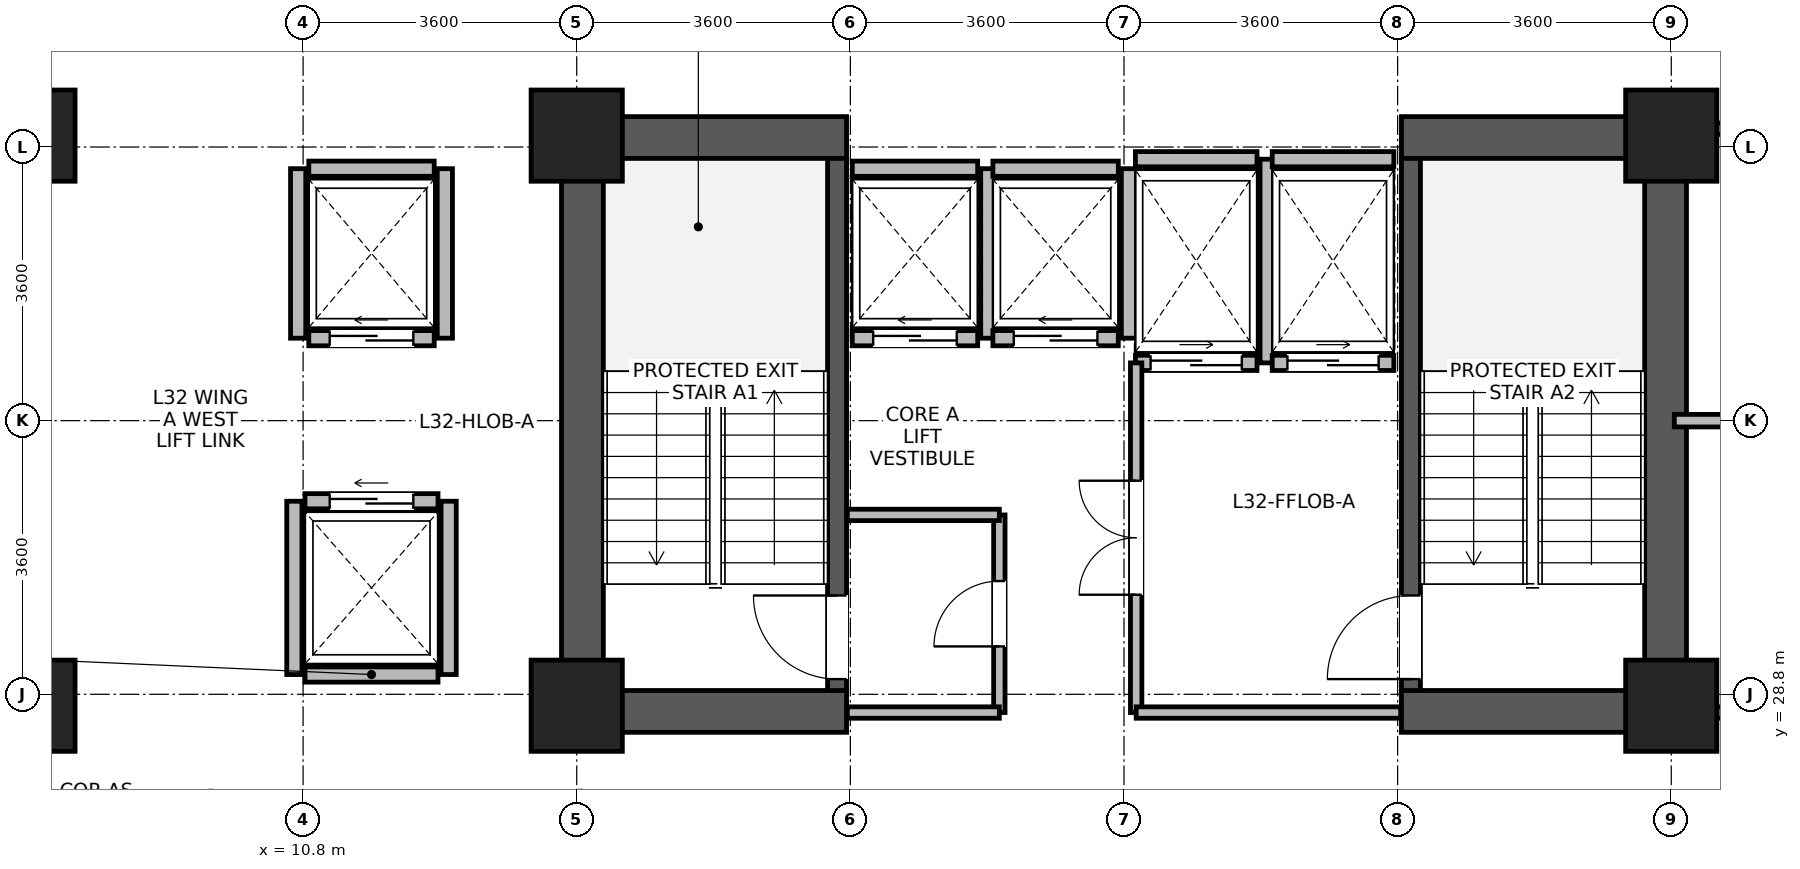
"""IFC4 building model, lengths in metres.
Left out: names, types, materials, properties, quantities, classifications, styles, units other than length and angle.
Written with IfcOpenShell. Run it as: python <this file> out.ifc"""

import sys

from ifc_helpers import new_model, si_unit, direction, frame, frame_2d, origin, origin_2d, place, context, subcontext, project, spatial, rectangle, extrude, source, transform, mapped, element, fill, save


model = new_model("IFC4")
c1 = context("Model", 3, precision=1e-05, world=origin(), true_north=direction((0.0, 1.0)))
c2 = subcontext(c1, "Body", "Model", "MODEL_VIEW")
j1 = project(units=[si_unit("LENGTHUNIT", "METRE"), si_unit("PLANEANGLEUNIT", "RADIAN")], contexts=[c1])
p1 = place(None, origin())
s1 = spatial("IfcSite", under=j1, at=p1, CompositionType="ELEMENT")
p2 = place(p1, origin())
s2 = spatial("IfcBuilding", under=s1, at=p2, CompositionType="ELEMENT")
p3 = place(p2, frame((0.0, 0.0, 126.7)))
s3 = spatial("IfcBuildingStorey", under=s2, at=p3, CompositionType="ELEMENT", Elevation=126.7)
for number, where, z_axis, x_axis in (
    (1, (14.475, 28.3, 0.0), (0.0, 0.0, 1.0), (0.0, 1.0, 0.0)),
    (2, (28.725, 28.3, 0.0), (0.0, 0.0, 1.0), (0.0, 1.0, 0.0)),
):
    element("IfcWall", number, at=place(p3, frame(where, z_axis=z_axis, x_axis=x_axis)), inside=s3, PredefinedType="SHEAR", context=c2, shape_type="SweptSolid", body=[
        extrude(rectangle(XDim=8.1, YDim=0.55, at=frame_2d((4.05, 0.0))), origin(), (0.0, 0.0, 1.0), 3.34),
    ])
for number, where, z_axis, x_axis in (
    (3, (14.75, 28.575, 0.0), (0.0, 0.0, 1.0), (1.0, 0.0, 0.0)),
    (4, (25.25, 28.575, 0.0), (0.0, 0.0, 1.0), (1.0, 0.0, 0.0)),
    (5, (14.75, 36.125, 0.0), (0.0, 0.0, 1.0), (1.0, 0.0, 0.0)),
    (6, (25.25, 36.125, 0.0), (0.0, 0.0, 1.0), (1.0, 0.0, 0.0)),
):
    element("IfcWall", number, at=place(p3, frame(where, z_axis=z_axis, x_axis=x_axis)), inside=s3, PredefinedType="SHEAR", context=c2, shape_type="SweptSolid", body=[
        extrude(rectangle(XDim=3.2, YDim=0.55, at=frame_2d((1.6, 0.0))), origin(), (0.0, 0.0, 1.0), 3.34),
    ])
p4 = place(p3, frame((17.825, 28.85, 0.0), z_axis=(0.0, 0.0, 1.0), x_axis=(0.0, 1.0, 0.0)))
e7 = element("IfcWall", 7, at=p4, inside=s3, PredefinedType="SHEAR", context=c2, shape_type="SweptSolid", body=[
    extrude(rectangle(XDim=7.0, YDim=0.25, at=frame_2d((3.5, 0.0))), origin(), (0.0, 0.0, 1.0), 3.34),
])
p5 = place(p4, frame((0.15, 0.0, 0.0)))
e8 = element("IfcOpeningElement", 8, at=p5, cuts=e7, PredefinedType="OPENING", context=c2, shape_type="SweptSolid", body=[
    extrude(rectangle(XDim=1.1, YDim=2.08, at=frame_2d((0.55, 1.04))), frame((0.0, 0.135, 0.0), z_axis=(0.0, -1.0, 0.0), x_axis=(1.0, 0.0, 0.0)), (0.0, 0.0, 1.0), 0.27),
])
p6 = place(p3, frame((25.375, 28.85, 0.0), z_axis=(0.0, 0.0, 1.0), x_axis=(0.0, 1.0, 0.0)))
e9 = element("IfcWall", 9, at=p6, inside=s3, PredefinedType="SHEAR", context=c2, shape_type="SweptSolid", body=[
    extrude(rectangle(XDim=7.0, YDim=0.25, at=frame_2d((3.5, 0.0))), origin(), (0.0, 0.0, 1.0), 3.34),
])
p7 = place(p6, frame((0.15, 0.0, 0.0)))
e10 = element("IfcOpeningElement", 10, at=p7, cuts=e9, PredefinedType="OPENING", context=c2, shape_type="SweptSolid", body=[
    extrude(rectangle(XDim=1.1, YDim=2.08, at=frame_2d((0.55, 1.04))), frame((0.0, 0.135, 0.0), z_axis=(0.0, -1.0, 0.0), x_axis=(1.0, 0.0, 0.0)), (0.0, 0.0, 1.0), 0.27),
])
m1 = source(origin(), c2, "Body", "SweptSolid", [
    extrude(rectangle(XDim=1.2, YDim=1.2, at=origin_2d()), origin(), (0.0, 0.0, 1.0), 3.7),
])
for number, where, z_axis, x_axis in (
    (11, (7.2, 28.65, 0.0), (0.0, 0.0, 1.0), (1.0, 0.0, 0.0)),
    (12, (7.2, 36.15, 0.0), (0.0, 0.0, 1.0), (1.0, 0.0, 0.0)),
    (13, (14.4, 28.65, 0.0), (0.0, 0.0, 1.0), (1.0, 0.0, 0.0)),
    (14, (14.4, 36.15, 0.0), (0.0, 0.0, 1.0), (1.0, 0.0, 0.0)),
    (15, (28.8, 28.65, 0.0), (0.0, 0.0, 1.0), (1.0, 0.0, 0.0)),
    (16, (28.8, 36.15, 0.0), (0.0, 0.0, 1.0), (1.0, 0.0, 0.0)),
):
    element("IfcColumn", number, at=place(p3, frame(where, z_axis=z_axis, x_axis=x_axis)), inside=s3, PredefinedType="COLUMN", context=c2, shape_type="MappedRepresentation", body=[
        mapped(m1, transform((0.0, 0.0, 0.0), x_axis=(1.0, 0.0, 0.0), y_axis=(0.0, 1.0, 0.0), z_axis=(0.0, 0.0, 1.0), scale=1.0)),
    ])
p8 = place(p3, frame((18.025, 33.485, 0.0), z_axis=(0.0, 0.0, 1.0), x_axis=(1.0, 0.0, 0.0)))
e17 = element("IfcWall", 17, at=p8, inside=s3, PredefinedType="PARTITIONING", context=c2, shape_type="SweptSolid", body=[
    extrude(rectangle(XDim=1.65, YDim=0.2, at=frame_2d((0.825, 0.0))), origin(), (0.0, 0.0, 1.0), 3.32),
])
p9 = place(p8, frame((0.275, 0.0, 0.0)))
e18 = element("IfcOpeningElement", 18, at=p9, cuts=e17, PredefinedType="OPENING", context=c2, shape_type="SweptSolid", body=[
    extrude(rectangle(XDim=1.1, YDim=2.12, at=frame_2d((0.55, 1.06))), frame((0.0, 0.11, 0.0), z_axis=(0.0, -1.0, 0.0), x_axis=(1.0, 0.0, 0.0)), (0.0, 0.0, 1.0), 0.22),
])
p10 = place(p3, frame((18.025, 35.715, 0.0), z_axis=(0.0, 0.0, 1.0), x_axis=(1.0, 0.0, 0.0)))
e19 = element("IfcWall", 19, at=p10, inside=s3, PredefinedType="PARTITIONING", context=c2, shape_type="SweptSolid", body=[
    extrude(rectangle(XDim=1.65, YDim=0.2, at=frame_2d((0.825, 0.0))), origin(), (0.0, 0.0, 1.0), 3.32),
])
p11 = place(p3, frame((19.815, 33.485, 0.0), z_axis=(0.0, 0.0, 1.0), x_axis=(0.0, 1.0, 0.0)))
e20 = element("IfcWall", 20, at=p11, inside=s3, PredefinedType="PARTITIONING", context=c2, shape_type="SweptSolid", body=[
    extrude(rectangle(XDim=2.23, YDim=0.2, at=frame_2d((1.115, 0.0))), origin(), (0.0, 0.0, 1.0), 3.32),
])
p12 = place(p3, frame((19.875, 33.485, 0.0), z_axis=(0.0, 0.0, 1.0), x_axis=(1.0, 0.0, 0.0)))
e21 = element("IfcWall", 21, at=p12, inside=s3, PredefinedType="PARTITIONING", context=c2, shape_type="SweptSolid", body=[
    extrude(rectangle(XDim=1.65, YDim=0.2, at=frame_2d((0.825, 0.0))), origin(), (0.0, 0.0, 1.0), 3.32),
])
p13 = place(p12, frame((0.275, 0.0, 0.0)))
e22 = element("IfcOpeningElement", 22, at=p13, cuts=e21, PredefinedType="OPENING", context=c2, shape_type="SweptSolid", body=[
    extrude(rectangle(XDim=1.1, YDim=2.12, at=frame_2d((0.55, 1.06))), frame((0.0, 0.11, 0.0), z_axis=(0.0, -1.0, 0.0), x_axis=(1.0, 0.0, 0.0)), (0.0, 0.0, 1.0), 0.22),
])
p14 = place(p3, frame((19.875, 35.715, 0.0), z_axis=(0.0, 0.0, 1.0), x_axis=(1.0, 0.0, 0.0)))
e23 = element("IfcWall", 23, at=p14, inside=s3, PredefinedType="PARTITIONING", context=c2, shape_type="SweptSolid", body=[
    extrude(rectangle(XDim=1.65, YDim=0.2, at=frame_2d((0.825, 0.0))), origin(), (0.0, 0.0, 1.0), 3.32),
])
p15 = place(p3, frame((21.665, 33.485, 0.0), z_axis=(0.0, 0.0, 1.0), x_axis=(0.0, 1.0, 0.0)))
e24 = element("IfcWall", 24, at=p15, inside=s3, PredefinedType="PARTITIONING", context=c2, shape_type="SweptSolid", body=[
    extrude(rectangle(XDim=2.23, YDim=0.2, at=frame_2d((1.115, 0.0))), origin(), (0.0, 0.0, 1.0), 3.32),
])
p16 = place(p3, frame((10.825, 29.06, 0.0), z_axis=(0.0, 0.0, 1.0), x_axis=(1.0, 0.0, 0.0)))
e25 = element("IfcWall", 25, at=p16, inside=s3, PredefinedType="PARTITIONING", context=c2, shape_type="SweptSolid", body=[
    extrude(rectangle(XDim=1.75, YDim=0.2, at=frame_2d((0.875, 0.0))), origin(), (0.0, 0.0, 1.0), 3.32),
])
p17 = place(p3, frame((10.825, 31.34, 0.0), z_axis=(0.0, 0.0, 1.0), x_axis=(1.0, 0.0, 0.0)))
e26 = element("IfcWall", 26, at=p17, inside=s3, PredefinedType="PARTITIONING", context=c2, shape_type="SweptSolid", body=[
    extrude(rectangle(XDim=1.75, YDim=0.2, at=frame_2d((0.875, 0.0))), origin(), (0.0, 0.0, 1.0), 3.32),
])
p18 = place(p17, frame((0.325, 0.0, 0.0)))
e27 = element("IfcOpeningElement", 27, at=p18, cuts=e26, PredefinedType="OPENING", context=c2, shape_type="SweptSolid", body=[
    extrude(rectangle(XDim=1.1, YDim=2.12, at=frame_2d((0.55, 1.06))), frame((0.0, 0.11, 0.0), z_axis=(0.0, -1.0, 0.0), x_axis=(1.0, 0.0, 0.0)), (0.0, 0.0, 1.0), 0.22),
])
for number, where, z_axis, x_axis in (
    (28, (10.685, 29.06, 0.0), (0.0, 0.0, 1.0), (0.0, 1.0, 0.0)),
    (29, (12.715, 29.06, 0.0), (0.0, 0.0, 1.0), (0.0, 1.0, 0.0)),
):
    element("IfcWall", number, at=place(p3, frame(where, z_axis=z_axis, x_axis=x_axis)), inside=s3, PredefinedType="PARTITIONING", context=c2, shape_type="SweptSolid", body=[
        extrude(rectangle(XDim=2.28, YDim=0.2, at=frame_2d((1.14, 0.0))), origin(), (0.0, 0.0, 1.0), 3.32),
    ])
p19 = place(p3, frame((10.875, 33.485, 0.0), z_axis=(0.0, 0.0, 1.0), x_axis=(1.0, 0.0, 0.0)))
e30 = element("IfcWall", 30, at=p19, inside=s3, PredefinedType="PARTITIONING", context=c2, shape_type="SweptSolid", body=[
    extrude(rectangle(XDim=1.65, YDim=0.2, at=frame_2d((0.825, 0.0))), origin(), (0.0, 0.0, 1.0), 3.32),
])
p20 = place(p19, frame((0.275, 0.0, 0.0)))
e31 = element("IfcOpeningElement", 31, at=p20, cuts=e30, PredefinedType="OPENING", context=c2, shape_type="SweptSolid", body=[
    extrude(rectangle(XDim=1.1, YDim=2.12, at=frame_2d((0.55, 1.06))), frame((0.0, 0.11, 0.0), z_axis=(0.0, -1.0, 0.0), x_axis=(1.0, 0.0, 0.0)), (0.0, 0.0, 1.0), 0.22),
])
p21 = place(p3, frame((10.875, 35.715, 0.0), z_axis=(0.0, 0.0, 1.0), x_axis=(1.0, 0.0, 0.0)))
e32 = element("IfcWall", 32, at=p21, inside=s3, PredefinedType="PARTITIONING", context=c2, shape_type="SweptSolid", body=[
    extrude(rectangle(XDim=1.65, YDim=0.2, at=frame_2d((0.825, 0.0))), origin(), (0.0, 0.0, 1.0), 3.32),
])
for number, where, z_axis, x_axis in (
    (33, (10.735, 33.485, 0.0), (0.0, 0.0, 1.0), (0.0, 1.0, 0.0)),
    (34, (12.665, 33.485, 0.0), (0.0, 0.0, 1.0), (0.0, 1.0, 0.0)),
):
    element("IfcWall", number, at=place(p3, frame(where, z_axis=z_axis, x_axis=x_axis)), inside=s3, PredefinedType="PARTITIONING", context=c2, shape_type="SweptSolid", body=[
        extrude(rectangle(XDim=2.23, YDim=0.2, at=frame_2d((1.115, 0.0))), origin(), (0.0, 0.0, 1.0), 3.32),
    ])
p22 = place(p3, frame((21.75, 33.16, 0.0), z_axis=(0.0, 0.0, 1.0), x_axis=(1.0, 0.0, 0.0)))
e35 = element("IfcWall", 35, at=p22, inside=s3, PredefinedType="PARTITIONING", context=c2, shape_type="SweptSolid", body=[
    extrude(rectangle(XDim=1.6, YDim=0.2, at=frame_2d((0.8, 0.0))), origin(), (0.0, 0.0, 1.0), 3.32),
])
p23 = place(p22, frame((0.2, 0.0, 0.0)))
e36 = element("IfcOpeningElement", 36, at=p23, cuts=e35, PredefinedType="OPENING", context=c2, shape_type="SweptSolid", body=[
    extrude(rectangle(XDim=1.2, YDim=2.12, at=frame_2d((0.6, 1.06))), frame((0.0, 0.11, 0.0), z_axis=(0.0, -1.0, 0.0), x_axis=(1.0, 0.0, 0.0)), (0.0, 0.0, 1.0), 0.22),
])
p24 = place(p3, frame((21.75, 35.84, 0.0), z_axis=(0.0, 0.0, 1.0), x_axis=(1.0, 0.0, 0.0)))
e37 = element("IfcWall", 37, at=p24, inside=s3, PredefinedType="PARTITIONING", context=c2, shape_type="SweptSolid", body=[
    extrude(rectangle(XDim=1.6, YDim=0.2, at=frame_2d((0.8, 0.0))), origin(), (0.0, 0.0, 1.0), 2.32),
])
p25 = place(p3, frame((23.49, 33.16, 0.0), z_axis=(0.0, 0.0, 1.0), x_axis=(0.0, 1.0, 0.0)))
e38 = element("IfcWall", 38, at=p25, inside=s3, PredefinedType="PARTITIONING", context=c2, shape_type="SweptSolid", body=[
    extrude(rectangle(XDim=2.68, YDim=0.2, at=frame_2d((1.34, 0.0))), origin(), (0.0, 0.0, 1.0), 3.32),
])
p26 = place(p3, frame((23.55, 33.16, 0.0), z_axis=(0.0, 0.0, 1.0), x_axis=(1.0, 0.0, 0.0)))
e39 = element("IfcWall", 39, at=p26, inside=s3, PredefinedType="PARTITIONING", context=c2, shape_type="SweptSolid", body=[
    extrude(rectangle(XDim=1.6, YDim=0.2, at=frame_2d((0.8, 0.0))), origin(), (0.0, 0.0, 1.0), 3.32),
])
p27 = place(p26, frame((0.2, 0.0, 0.0)))
e40 = element("IfcOpeningElement", 40, at=p27, cuts=e39, PredefinedType="OPENING", context=c2, shape_type="SweptSolid", body=[
    extrude(rectangle(XDim=1.2, YDim=2.12, at=frame_2d((0.6, 1.06))), frame((0.0, 0.11, 0.0), z_axis=(0.0, -1.0, 0.0), x_axis=(1.0, 0.0, 0.0)), (0.0, 0.0, 1.0), 0.22),
])
p28 = place(p3, frame((23.55, 35.84, 0.0), z_axis=(0.0, 0.0, 1.0), x_axis=(1.0, 0.0, 0.0)))
e41 = element("IfcWall", 41, at=p28, inside=s3, PredefinedType="PARTITIONING", context=c2, shape_type="SweptSolid", body=[
    extrude(rectangle(XDim=1.6, YDim=0.2, at=frame_2d((0.8, 0.0))), origin(), (0.0, 0.0, 1.0), 2.32),
])
p29 = place(p3, frame((29.4, 28.56, 0.0), z_axis=(0.0, 0.0, 1.0), x_axis=(1.0, 0.0, 0.0)))
e42 = element("IfcWall", 42, at=p29, inside=s3, PredefinedType="PARTITIONING", context=c2, shape_type="SweptSolid", body=[
    extrude(rectangle(XDim=3.96, YDim=0.15, at=frame_2d((1.98, 0.0))), origin(), (0.0, 0.0, 1.0), 2.67),
])
p30 = place(p29, frame((1.55, 0.0, 0.0)))
e43 = element("IfcOpeningElement", 43, at=p30, cuts=e42, PredefinedType="OPENING", context=c2, shape_type="SweptSolid", body=[
    extrude(rectangle(XDim=0.86, YDim=2.02, at=frame_2d((0.43, 1.01))), frame((0.0, 0.085, 0.0), z_axis=(0.0, -1.0, 0.0), x_axis=(1.0, 0.0, 0.0)), (0.0, 0.0, 1.0), 0.17),
])
p31 = place(p3, frame((29.4, 36.24, 0.0), z_axis=(0.0, 0.0, 1.0), x_axis=(1.0, 0.0, 0.0)))
e44 = element("IfcWall", 44, at=p31, inside=s3, PredefinedType="PARTITIONING", context=c2, shape_type="SweptSolid", body=[
    extrude(rectangle(XDim=3.96, YDim=0.15, at=frame_2d((1.98, 0.0))), origin(), (0.0, 0.0, 1.0), 2.67),
])
p32 = place(p31, frame((1.33, 0.0, 0.0)))
e45 = element("IfcOpeningElement", 45, at=p32, cuts=e44, PredefinedType="OPENING", context=c2, shape_type="SweptSolid", body=[
    extrude(rectangle(XDim=1.3, YDim=2.12, at=frame_2d((0.65, 1.06))), frame((0.0, 0.085, 0.0), z_axis=(0.0, -1.0, 0.0), x_axis=(1.0, 0.0, 0.0)), (0.0, 0.0, 1.0), 0.17),
])
p33 = place(p3, frame((19.96, 28.56, 0.0), z_axis=(0.0, 0.0, 1.0), x_axis=(0.0, 1.0, 0.0)))
e46 = element("IfcWall", 46, at=p33, inside=s3, PredefinedType="PARTITIONING", context=c2, shape_type="SweptSolid", body=[
    extrude(rectangle(XDim=2.6, YDim=0.15, at=frame_2d((1.3, 0.0))), origin(), (0.0, 0.0, 1.0), 3.32),
])
p34 = place(p33, frame((0.87, 0.0, 0.0)))
e47 = element("IfcOpeningElement", 47, at=p34, cuts=e46, PredefinedType="OPENING", context=c2, shape_type="SweptSolid", body=[
    extrude(rectangle(XDim=0.86, YDim=2.02, at=frame_2d((0.43, 1.01))), frame((0.0, 0.085, 0.0), z_axis=(0.0, -1.0, 0.0), x_axis=(1.0, 0.0, 0.0)), (0.0, 0.0, 1.0), 0.17),
])
p35 = place(p3, frame((17.96, 28.56, 0.0), z_axis=(0.0, 0.0, 1.0), x_axis=(1.0, 0.0, 0.0)))
e48 = element("IfcWall", 48, at=p35, inside=s3, PredefinedType="PARTITIONING", context=c2, shape_type="SweptSolid", body=[
    extrude(rectangle(XDim=2.0, YDim=0.15, at=frame_2d((1.0, 0.0))), origin(), (0.0, 0.0, 1.0), 2.32),
])
p36 = place(p3, frame((17.96, 31.16, 0.0), z_axis=(0.0, 0.0, 1.0), x_axis=(1.0, 0.0, 0.0)))
e49 = element("IfcWall", 49, at=p36, inside=s3, PredefinedType="PARTITIONING", context=c2, shape_type="SweptSolid", body=[
    extrude(rectangle(XDim=2.0, YDim=0.15, at=frame_2d((1.0, 0.0))), origin(), (0.0, 0.0, 1.0), 3.32),
])
p37 = place(p3, frame((21.76, 28.56, 0.0), z_axis=(0.0, 0.0, 1.0), x_axis=(0.0, 1.0, 0.0)))
e50 = element("IfcWall", 50, at=p37, inside=s3, PredefinedType="PARTITIONING", context=c2, shape_type="SweptSolid", body=[
    extrude(rectangle(XDim=4.6, YDim=0.15, at=frame_2d((2.3, 0.0))), origin(), (0.0, 0.0, 1.0), 3.32),
])
p38 = place(p37, frame((1.55, 0.0, 0.0)))
e51 = element("IfcOpeningElement", 51, at=p38, cuts=e50, PredefinedType="OPENING", context=c2, shape_type="SweptSolid", body=[
    extrude(rectangle(XDim=1.5, YDim=2.1, at=frame_2d((0.75, 1.05))), frame((0.0, 0.085, 0.0), z_axis=(0.0, -1.0, 0.0), x_axis=(1.0, 0.0, 0.0)), (0.0, 0.0, 1.0), 0.17),
])
p39 = place(p3, frame((28.84, 32.4, 0.0), z_axis=(0.0, 0.0, 1.0), x_axis=(1.0, 0.0, 0.0)))
e52 = element("IfcWall", 52, at=p39, inside=s3, PredefinedType="PARTITIONING", context=c2, shape_type="SweptSolid", body=[
    extrude(rectangle(XDim=4.52, YDim=0.165, at=frame_2d((2.26, 0.0))), origin(), (0.0, 0.0, 1.0), 3.32),
])
p40 = place(p3, frame((21.76, 28.56, 0.0), z_axis=(0.0, 0.0, 1.0), x_axis=(1.0, 0.0, 0.0)))
e53 = element("IfcWall", 53, at=p40, inside=s3, PredefinedType="PARTITIONING", context=c2, shape_type="SweptSolid", body=[
    extrude(rectangle(XDim=3.48, YDim=0.15, at=frame_2d((1.74, 0.0))), origin(), (0.0, 0.0, 1.0), 2.32),
])
p41 = place(p5, origin())
e54 = element("IfcDoor", 54, at=p41, inside=s3, OperationType="SINGLE_SWING_RIGHT", PredefinedType="DOOR", context=c2, shape_type="SweptSolid", body=[
    extrude(rectangle(XDim=1.1, YDim=2.08, at=frame_2d((0.55, 1.04))), frame((0.0, 0.025, 0.0), z_axis=(0.0, -1.0, 0.0), x_axis=(1.0, 0.0, 0.0)), (0.0, 0.0, 1.0), 0.05),
])
fill(e8, e54)
p42 = place(p7, origin())
e55 = element("IfcDoor", 55, at=p42, inside=s3, OperationType="SINGLE_SWING_LEFT", PredefinedType="DOOR", context=c2, shape_type="SweptSolid", body=[
    extrude(rectangle(XDim=1.1, YDim=2.08, at=frame_2d((0.55, 1.04))), frame((0.0, 0.025, 0.0), z_axis=(0.0, -1.0, 0.0), x_axis=(1.0, 0.0, 0.0)), (0.0, 0.0, 1.0), 0.05),
])
fill(e10, e55)
p43 = place(p9, origin())
e56 = element("IfcDoor", 56, at=p43, inside=s3, OperationType="SLIDING_TO_LEFT", PredefinedType="DOOR", context=c2, shape_type="SweptSolid", body=[
    extrude(rectangle(XDim=1.1, YDim=2.12, at=frame_2d((0.55, 1.06))), frame((0.0, 0.025, 0.0), z_axis=(0.0, -1.0, 0.0), x_axis=(1.0, 0.0, 0.0)), (0.0, 0.0, 1.0), 0.05),
])
fill(e18, e56)
p44 = place(p13, origin())
e57 = element("IfcDoor", 57, at=p44, inside=s3, OperationType="SLIDING_TO_LEFT", PredefinedType="DOOR", context=c2, shape_type="SweptSolid", body=[
    extrude(rectangle(XDim=1.1, YDim=2.12, at=frame_2d((0.55, 1.06))), frame((0.0, 0.025, 0.0), z_axis=(0.0, -1.0, 0.0), x_axis=(1.0, 0.0, 0.0)), (0.0, 0.0, 1.0), 0.05),
])
fill(e22, e57)
p45 = place(p18, origin())
e58 = element("IfcDoor", 58, at=p45, inside=s3, OperationType="SLIDING_TO_LEFT", PredefinedType="DOOR", context=c2, shape_type="SweptSolid", body=[
    extrude(rectangle(XDim=1.1, YDim=2.12, at=frame_2d((0.55, 1.06))), frame((0.0, 0.025, 0.0), z_axis=(0.0, -1.0, 0.0), x_axis=(1.0, 0.0, 0.0)), (0.0, 0.0, 1.0), 0.05),
])
fill(e27, e58)
p46 = place(p20, origin())
e59 = element("IfcDoor", 59, at=p46, inside=s3, OperationType="SLIDING_TO_LEFT", PredefinedType="DOOR", context=c2, shape_type="SweptSolid", body=[
    extrude(rectangle(XDim=1.1, YDim=2.12, at=frame_2d((0.55, 1.06))), frame((0.0, 0.025, 0.0), z_axis=(0.0, -1.0, 0.0), x_axis=(1.0, 0.0, 0.0)), (0.0, 0.0, 1.0), 0.05),
])
fill(e31, e59)
p47 = place(p23, origin())
e60 = element("IfcDoor", 60, at=p47, inside=s3, OperationType="SLIDING_TO_RIGHT", PredefinedType="DOOR", context=c2, shape_type="SweptSolid", body=[
    extrude(rectangle(XDim=1.2, YDim=2.12, at=frame_2d((0.6, 1.06))), frame((0.0, 0.025, 0.0), z_axis=(0.0, -1.0, 0.0), x_axis=(1.0, 0.0, 0.0)), (0.0, 0.0, 1.0), 0.05),
])
fill(e36, e60)
p48 = place(p27, origin())
e61 = element("IfcDoor", 61, at=p48, inside=s3, OperationType="SLIDING_TO_RIGHT", PredefinedType="DOOR", context=c2, shape_type="SweptSolid", body=[
    extrude(rectangle(XDim=1.2, YDim=2.12, at=frame_2d((0.6, 1.06))), frame((0.0, 0.025, 0.0), z_axis=(0.0, -1.0, 0.0), x_axis=(1.0, 0.0, 0.0)), (0.0, 0.0, 1.0), 0.05),
])
fill(e40, e61)
p49 = place(p34, origin())
e62 = element("IfcDoor", 62, at=p49, inside=s3, OperationType="SINGLE_SWING_LEFT", PredefinedType="DOOR", context=c2, shape_type="SweptSolid", body=[
    extrude(rectangle(XDim=0.86, YDim=2.02, at=frame_2d((0.43, 1.01))), frame((0.0, 0.025, 0.0), z_axis=(0.0, -1.0, 0.0), x_axis=(1.0, 0.0, 0.0)), (0.0, 0.0, 1.0), 0.05),
])
fill(e47, e62)
p50 = place(p38, origin())
e63 = element("IfcDoor", 63, at=p50, inside=s3, OperationType="DOUBLE_DOOR_SINGLE_SWING", PredefinedType="DOOR", context=c2, shape_type="SweptSolid", body=[
    extrude(rectangle(XDim=1.5, YDim=2.1, at=frame_2d((0.75, 1.05))), frame((0.0, 0.025, 0.0), z_axis=(0.0, -1.0, 0.0), x_axis=(1.0, 0.0, 0.0)), (0.0, 0.0, 1.0), 0.05),
])
fill(e51, e63)
save(model, sys.argv[1])
